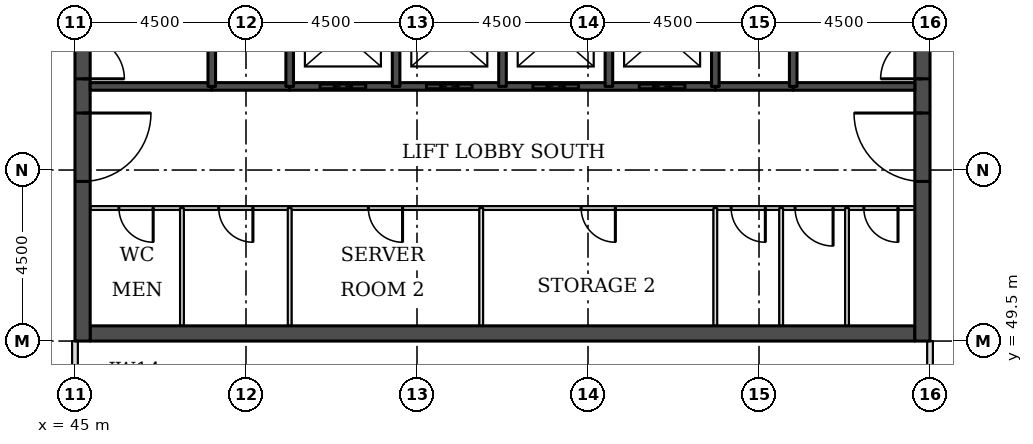
"""IFC4 building model, lengths in metres.
Left out: names, types, materials, properties, quantities, classifications, styles, units other than length and angle.
Written with IfcOpenShell. Run it as: python <this file> out.ifc"""

import sys

from ifc_helpers import new_model, si_unit, direction, frame, frame_2d, origin, place, context, subcontext, project, spatial, rectangle, extrude, element, fill, save


model = new_model("IFC4")
c1 = context("Model", 3, precision=1e-05, world=origin(), true_north=direction((0.0, 1.0)))
c2 = subcontext(c1, "Body", "Model", "MODEL_VIEW")
j1 = project(units=[si_unit("LENGTHUNIT", "METRE"), si_unit("PLANEANGLEUNIT", "RADIAN")], contexts=[c1])
p1 = place(None, origin())
s1 = spatial("IfcSite", under=j1, at=p1, CompositionType="ELEMENT")
p2 = place(p1, origin())
s2 = spatial("IfcBuilding", under=s1, at=p2, CompositionType="ELEMENT")
p3 = place(p2, frame((0.0, 0.0, 155.1)))
s3 = spatial("IfcBuildingStorey", under=s2, at=p3, CompositionType="ELEMENT", Elevation=155.1)
p4 = place(p3, frame((45.4, 49.7, 0.0), z_axis=(0.0, 0.0, 1.0), x_axis=(1.0, 0.0, 0.0)))
e1 = element("IfcWall", 1, at=p4, inside=s3, PredefinedType="SHEAR", context=c2, shape_type="SweptSolid", body=[
    extrude(rectangle(XDim=21.7, YDim=0.4, at=frame_2d((10.85, 0.0))), origin(), (0.0, 0.0, 1.0), 3.7),
])
p5 = place(p3, frame((45.2, 49.5, 0.0), z_axis=(0.0, 0.0, 1.0), x_axis=(0.0, 1.0, 0.0)))
e2 = element("IfcWall", 2, at=p5, inside=s3, PredefinedType="SHEAR", context=c2, shape_type="SweptSolid", body=[
    extrude(rectangle(XDim=22.5, YDim=0.4, at=frame_2d((11.25, 0.0))), origin(), (0.0, 0.0, 1.0), 3.7),
])
p6 = place(p5, frame((4.2, 0.0, 0.0)))
e3 = element("IfcOpeningElement", 3, at=p6, cuts=e2, PredefinedType="OPENING", context=c2, shape_type="SweptSolid", body=[
    extrude(rectangle(XDim=1.8, YDim=2.1, at=frame_2d((0.9, 1.05))), frame((0.0, 0.21, 0.0), z_axis=(0.0, -1.0, 0.0), x_axis=(1.0, 0.0, 0.0)), (0.0, 0.0, 1.0), 0.42),
])
p7 = place(p5, frame((6.9, 0.0, 0.0)))
e4 = element("IfcOpeningElement", 4, at=p7, cuts=e2, PredefinedType="OPENING", context=c2, shape_type="SweptSolid", body=[
    extrude(rectangle(XDim=1.1, YDim=2.1, at=frame_2d((0.55, 1.05))), frame((0.0, 0.21, 0.0), z_axis=(0.0, -1.0, 0.0), x_axis=(1.0, 0.0, 0.0)), (0.0, 0.0, 1.0), 0.42),
])
p8 = place(p5, frame((13.6, 0.0, 0.0)))
e5 = element("IfcOpeningElement", 5, at=p8, cuts=e2, PredefinedType="OPENING", context=c2, shape_type="SweptSolid", body=[
    extrude(rectangle(XDim=1.1, YDim=2.1, at=frame_2d((0.55, 1.05))), frame((0.0, 0.21, 0.0), z_axis=(0.0, -1.0, 0.0), x_axis=(1.0, 0.0, 0.0)), (0.0, 0.0, 1.0), 0.42),
])
p9 = place(p5, frame((16.5, 0.0, 0.0)))
e6 = element("IfcOpeningElement", 6, at=p9, cuts=e2, PredefinedType="OPENING", context=c2, shape_type="SweptSolid", body=[
    extrude(rectangle(XDim=1.8, YDim=2.1, at=frame_2d((0.9, 1.05))), frame((0.0, 0.21, 0.0), z_axis=(0.0, -1.0, 0.0), x_axis=(1.0, 0.0, 0.0)), (0.0, 0.0, 1.0), 0.42),
])
p10 = place(p3, frame((67.3, 49.5, 0.0), z_axis=(0.0, 0.0, 1.0), x_axis=(0.0, 1.0, 0.0)))
e7 = element("IfcWall", 7, at=p10, inside=s3, PredefinedType="SHEAR", context=c2, shape_type="SweptSolid", body=[
    extrude(rectangle(XDim=22.5, YDim=0.4, at=frame_2d((11.25, 0.0))), origin(), (0.0, 0.0, 1.0), 3.7),
])
p11 = place(p10, frame((4.2, 0.0, 0.0)))
e8 = element("IfcOpeningElement", 8, at=p11, cuts=e7, PredefinedType="OPENING", context=c2, shape_type="SweptSolid", body=[
    extrude(rectangle(XDim=1.8, YDim=2.1, at=frame_2d((0.9, 1.05))), frame((0.0, 0.21, 0.0), z_axis=(0.0, -1.0, 0.0), x_axis=(1.0, 0.0, 0.0)), (0.0, 0.0, 1.0), 0.42),
])
p12 = place(p10, frame((6.9, 0.0, 0.0)))
e9 = element("IfcOpeningElement", 9, at=p12, cuts=e7, PredefinedType="OPENING", context=c2, shape_type="SweptSolid", body=[
    extrude(rectangle(XDim=1.1, YDim=2.1, at=frame_2d((0.55, 1.05))), frame((0.0, 0.21, 0.0), z_axis=(0.0, -1.0, 0.0), x_axis=(1.0, 0.0, 0.0)), (0.0, 0.0, 1.0), 0.42),
])
p13 = place(p10, frame((13.6, 0.0, 0.0)))
e10 = element("IfcOpeningElement", 10, at=p13, cuts=e7, PredefinedType="OPENING", context=c2, shape_type="SweptSolid", body=[
    extrude(rectangle(XDim=1.1, YDim=2.1, at=frame_2d((0.55, 1.05))), frame((0.0, 0.21, 0.0), z_axis=(0.0, -1.0, 0.0), x_axis=(1.0, 0.0, 0.0)), (0.0, 0.0, 1.0), 0.42),
])
p14 = place(p10, frame((16.5, 0.0, 0.0)))
e11 = element("IfcOpeningElement", 11, at=p14, cuts=e7, PredefinedType="OPENING", context=c2, shape_type="SweptSolid", body=[
    extrude(rectangle(XDim=1.8, YDim=2.1, at=frame_2d((0.9, 1.05))), frame((0.0, 0.21, 0.0), z_axis=(0.0, -1.0, 0.0), x_axis=(1.0, 0.0, 0.0)), (0.0, 0.0, 1.0), 0.42),
])
p15 = place(p3, frame((67.5, 40.05, 0.0), z_axis=(0.0, 0.0, 1.0), x_axis=(0.0, 1.0, 0.0)))
e12 = element("IfcWall", 12, at=p15, inside=s3, PredefinedType="PARTITIONING", context=c2, shape_type="SweptSolid", body=[
    extrude(rectangle(XDim=9.45, YDim=0.15, at=frame_2d((4.725, 0.0))), origin(), (0.0, 0.0, 1.0), 3.022),
])
p16 = place(p3, frame((45.0, 48.0, 0.0), z_axis=(0.0, 0.0, 1.0), x_axis=(0.0, 1.0, 0.0)))
e13 = element("IfcWall", 13, at=p16, inside=s3, PredefinedType="PARTITIONING", context=c2, shape_type="SweptSolid", body=[
    extrude(rectangle(XDim=1.5, YDim=0.15, at=frame_2d((0.75, 0.0))), origin(), (0.0, 0.0, 1.0), 3.022),
])
p17 = place(p3, frame((45.4, 53.0, 0.0), z_axis=(0.0, 0.0, 1.0), x_axis=(1.0, 0.0, 0.0)))
e14 = element("IfcWall", 14, at=p17, inside=s3, PredefinedType="PARTITIONING", context=c2, shape_type="SweptSolid", body=[
    extrude(rectangle(XDim=21.7, YDim=0.1, at=frame_2d((10.85, 0.0))), origin(), (0.0, 0.0, 1.0), 3.55),
])
p18 = place(p17, frame((20.357, 0.0, 0.0)))
e15 = element("IfcOpeningElement", 15, at=p18, cuts=e14, PredefinedType="OPENING", context=c2, shape_type="SweptSolid", body=[
    extrude(rectangle(XDim=0.9, YDim=2.1, at=frame_2d((0.45, 1.05))), frame((0.0, 0.06, 0.0), z_axis=(0.0, -1.0, 0.0), x_axis=(1.0, 0.0, 0.0)), (0.0, 0.0, 1.0), 0.12),
])
p19 = place(p17, frame((18.549, 0.0, 0.0)))
e16 = element("IfcOpeningElement", 16, at=p19, cuts=e14, PredefinedType="OPENING", context=c2, shape_type="SweptSolid", body=[
    extrude(rectangle(XDim=1.0, YDim=2.1, at=frame_2d((0.5, 1.05))), frame((0.0, 0.06, 0.0), z_axis=(0.0, -1.0, 0.0), x_axis=(1.0, 0.0, 0.0)), (0.0, 0.0, 1.0), 0.12),
])
p20 = place(p17, frame((16.866, 0.0, 0.0)))
e17 = element("IfcOpeningElement", 17, at=p20, cuts=e14, PredefinedType="OPENING", context=c2, shape_type="SweptSolid", body=[
    extrude(rectangle(XDim=0.9, YDim=2.1, at=frame_2d((0.45, 1.05))), frame((0.0, 0.06, 0.0), z_axis=(0.0, -1.0, 0.0), x_axis=(1.0, 0.0, 0.0)), (0.0, 0.0, 1.0), 0.12),
])
p21 = place(p17, frame((0.758, 0.0, 0.0)))
e18 = element("IfcOpeningElement", 18, at=p21, cuts=e14, PredefinedType="OPENING", context=c2, shape_type="SweptSolid", body=[
    extrude(rectangle(XDim=0.9, YDim=2.1, at=frame_2d((0.45, 1.05))), frame((0.0, 0.06, 0.0), z_axis=(0.0, -1.0, 0.0), x_axis=(1.0, 0.0, 0.0)), (0.0, 0.0, 1.0), 0.12),
])
p22 = place(p17, frame((3.383, 0.0, 0.0)))
e19 = element("IfcOpeningElement", 19, at=p22, cuts=e14, PredefinedType="OPENING", context=c2, shape_type="SweptSolid", body=[
    extrude(rectangle(XDim=0.9, YDim=2.1, at=frame_2d((0.45, 1.05))), frame((0.0, 0.06, 0.0), z_axis=(0.0, -1.0, 0.0), x_axis=(1.0, 0.0, 0.0)), (0.0, 0.0, 1.0), 0.12),
])
p23 = place(p17, frame((7.32, 0.0, 0.0)))
e20 = element("IfcOpeningElement", 20, at=p23, cuts=e14, PredefinedType="OPENING", context=c2, shape_type="SweptSolid", body=[
    extrude(rectangle(XDim=0.9, YDim=2.1, at=frame_2d((0.45, 1.05))), frame((0.0, 0.06, 0.0), z_axis=(0.0, -1.0, 0.0), x_axis=(1.0, 0.0, 0.0)), (0.0, 0.0, 1.0), 0.12),
])
p24 = place(p17, frame((12.92, 0.0, 0.0)))
e21 = element("IfcOpeningElement", 21, at=p24, cuts=e14, PredefinedType="OPENING", context=c2, shape_type="SweptSolid", body=[
    extrude(rectangle(XDim=0.9, YDim=2.1, at=frame_2d((0.45, 1.05))), frame((0.0, 0.06, 0.0), z_axis=(0.0, -1.0, 0.0), x_axis=(1.0, 0.0, 0.0)), (0.0, 0.0, 1.0), 0.12),
])
for number, where, z_axis, x_axis in (
    (22, (48.6, 56.2, 0.0), (0.0, 0.0, 1.0), (1.0, 0.0, 0.0)),
    (23, (61.85, 56.2, 0.0), (0.0, 0.0, 1.0), (1.0, 0.0, 0.0)),
):
    element("IfcWall", number, at=place(p3, frame(where, z_axis=z_axis, x_axis=x_axis)), inside=s3, PredefinedType="SOLIDWALL", context=c2, shape_type="SweptSolid", body=[
        extrude(rectangle(XDim=2.05, YDim=0.2, at=frame_2d((1.025, 0.0))), origin(), (0.0, 0.0, 1.0), 3.55),
    ])
p25 = place(p3, frame((45.4, 56.2, 0.0), z_axis=(0.0, 0.0, 1.0), x_axis=(1.0, 0.0, 0.0)))
e24 = element("IfcWall", 24, at=p25, inside=s3, PredefinedType="SOLIDWALL", context=c2, shape_type="SweptSolid", body=[
    extrude(rectangle(XDim=3.2, YDim=0.2, at=frame_2d((1.6, 0.0))), origin(), (0.0, 0.0, 1.0), 3.55),
])
p26 = place(p3, frame((50.65, 56.2, 0.0), z_axis=(0.0, 0.0, 1.0), x_axis=(1.0, 0.0, 0.0)))
e25 = element("IfcWall", 25, at=p26, inside=s3, PredefinedType="SOLIDWALL", context=c2, shape_type="SweptSolid", body=[
    extrude(rectangle(XDim=11.2, YDim=0.2, at=frame_2d((5.6, 0.0))), origin(), (0.0, 0.0, 1.0), 3.55),
])
p27 = place(p26, frame((0.8, 0.0, 0.0)))
e26 = element("IfcOpeningElement", 26, at=p27, cuts=e25, PredefinedType="OPENING", context=c2, shape_type="SweptSolid", body=[
    extrude(rectangle(XDim=1.2, YDim=2.1, at=frame_2d((0.6, 1.05))), frame((0.0, 0.11, 0.0), z_axis=(0.0, -1.0, 0.0), x_axis=(1.0, 0.0, 0.0)), (0.0, 0.0, 1.0), 0.22),
])
p28 = place(p26, frame((3.6, 0.0, 0.0)))
e27 = element("IfcOpeningElement", 27, at=p28, cuts=e25, PredefinedType="OPENING", context=c2, shape_type="SweptSolid", body=[
    extrude(rectangle(XDim=1.2, YDim=2.1, at=frame_2d((0.6, 1.05))), frame((0.0, 0.11, 0.0), z_axis=(0.0, -1.0, 0.0), x_axis=(1.0, 0.0, 0.0)), (0.0, 0.0, 1.0), 0.22),
])
p29 = place(p26, frame((6.4, 0.0, 0.0)))
e28 = element("IfcOpeningElement", 28, at=p29, cuts=e25, PredefinedType="OPENING", context=c2, shape_type="SweptSolid", body=[
    extrude(rectangle(XDim=1.2, YDim=2.1, at=frame_2d((0.6, 1.05))), frame((0.0, 0.11, 0.0), z_axis=(0.0, -1.0, 0.0), x_axis=(1.0, 0.0, 0.0)), (0.0, 0.0, 1.0), 0.22),
])
p30 = place(p26, frame((9.2, 0.0, 0.0)))
e29 = element("IfcOpeningElement", 29, at=p30, cuts=e25, PredefinedType="OPENING", context=c2, shape_type="SweptSolid", body=[
    extrude(rectangle(XDim=1.2, YDim=2.1, at=frame_2d((0.6, 1.05))), frame((0.0, 0.11, 0.0), z_axis=(0.0, -1.0, 0.0), x_axis=(1.0, 0.0, 0.0)), (0.0, 0.0, 1.0), 0.22),
])
p31 = place(p3, frame((63.9, 56.2, 0.0), z_axis=(0.0, 0.0, 1.0), x_axis=(1.0, 0.0, 0.0)))
e30 = element("IfcWall", 30, at=p31, inside=s3, PredefinedType="SOLIDWALL", context=c2, shape_type="SweptSolid", body=[
    extrude(rectangle(XDim=3.2, YDim=0.2, at=frame_2d((1.6, 0.0))), origin(), (0.0, 0.0, 1.0), 3.55),
])
p32 = place(p3, frame((47.815, 49.9, 0.0), z_axis=(0.0, 0.0, 1.0), x_axis=(0.0, 1.0, 0.0)))
e31 = element("IfcWall", 31, at=p32, inside=s3, PredefinedType="PARTITIONING", context=c2, shape_type="SweptSolid", body=[
    extrude(rectangle(XDim=3.1, YDim=0.1, at=frame_2d((1.55, 0.0))), origin(), (0.0, 0.0, 1.0), 3.55),
])
p33 = place(p3, frame((48.6, 56.2, 0.0), z_axis=(0.0, 0.0, 1.0), x_axis=(0.0, 1.0, 0.0)))
e32 = element("IfcWall", 32, at=p33, inside=s3, PredefinedType="SOLIDWALL", context=c2, shape_type="SweptSolid", body=[
    extrude(rectangle(XDim=5.8, YDim=0.2, at=frame_2d((2.9, 0.0))), origin(), (0.0, 0.0, 1.0), 3.55),
])
p34 = place(p3, frame((50.65, 49.9, 0.0), z_axis=(0.0, 0.0, 1.0), x_axis=(0.0, 1.0, 0.0)))
e33 = element("IfcWall", 33, at=p34, inside=s3, PredefinedType="PARTITIONING", context=c2, shape_type="SweptSolid", body=[
    extrude(rectangle(XDim=3.1, YDim=0.1, at=frame_2d((1.55, 0.0))), origin(), (0.0, 0.0, 1.0), 3.55),
])
for number, where, z_axis, x_axis in (
    (34, (50.65, 56.2, 0.0), (0.0, 0.0, 1.0), (0.0, 1.0, 0.0)),
    (35, (53.45, 56.2, 0.0), (0.0, 0.0, 1.0), (0.0, 1.0, 0.0)),
):
    element("IfcWall", number, at=place(p3, frame(where, z_axis=z_axis, x_axis=x_axis)), inside=s3, PredefinedType="SOLIDWALL", context=c2, shape_type="SweptSolid", body=[
        extrude(rectangle(XDim=2.8, YDim=0.2, at=frame_2d((1.4, 0.0))), origin(), (0.0, 0.0, 1.0), 3.55),
    ])
p35 = place(p3, frame((55.69, 49.9, 0.0), z_axis=(0.0, 0.0, 1.0), x_axis=(0.0, 1.0, 0.0)))
e36 = element("IfcWall", 36, at=p35, inside=s3, PredefinedType="PARTITIONING", context=c2, shape_type="SweptSolid", body=[
    extrude(rectangle(XDim=3.1, YDim=0.1, at=frame_2d((1.55, 0.0))), origin(), (0.0, 0.0, 1.0), 3.55),
])
for number, where, z_axis, x_axis in (
    (37, (56.25, 56.2, 0.0), (0.0, 0.0, 1.0), (0.0, 1.0, 0.0)),
    (38, (59.05, 56.2, 0.0), (0.0, 0.0, 1.0), (0.0, 1.0, 0.0)),
):
    element("IfcWall", number, at=place(p3, frame(where, z_axis=z_axis, x_axis=x_axis)), inside=s3, PredefinedType="SOLIDWALL", context=c2, shape_type="SweptSolid", body=[
        extrude(rectangle(XDim=2.8, YDim=0.2, at=frame_2d((1.4, 0.0))), origin(), (0.0, 0.0, 1.0), 3.55),
    ])
p36 = place(p3, frame((61.85, 49.9, 0.0), z_axis=(0.0, 0.0, 1.0), x_axis=(0.0, 1.0, 0.0)))
e39 = element("IfcWall", 39, at=p36, inside=s3, PredefinedType="PARTITIONING", context=c2, shape_type="SweptSolid", body=[
    extrude(rectangle(XDim=3.1, YDim=0.1, at=frame_2d((1.55, 0.0))), origin(), (0.0, 0.0, 1.0), 3.55),
])
p37 = place(p3, frame((61.85, 56.2, 0.0), z_axis=(0.0, 0.0, 1.0), x_axis=(0.0, 1.0, 0.0)))
e40 = element("IfcWall", 40, at=p37, inside=s3, PredefinedType="SOLIDWALL", context=c2, shape_type="SweptSolid", body=[
    extrude(rectangle(XDim=2.8, YDim=0.2, at=frame_2d((1.4, 0.0))), origin(), (0.0, 0.0, 1.0), 3.55),
])
p38 = place(p3, frame((63.583, 49.9, 0.0), z_axis=(0.0, 0.0, 1.0), x_axis=(0.0, 1.0, 0.0)))
e41 = element("IfcWall", 41, at=p38, inside=s3, PredefinedType="PARTITIONING", context=c2, shape_type="SweptSolid", body=[
    extrude(rectangle(XDim=3.1, YDim=0.1, at=frame_2d((1.55, 0.0))), origin(), (0.0, 0.0, 1.0), 3.55),
])
p39 = place(p3, frame((63.9, 56.2, 0.0), z_axis=(0.0, 0.0, 1.0), x_axis=(0.0, 1.0, 0.0)))
e42 = element("IfcWall", 42, at=p39, inside=s3, PredefinedType="SOLIDWALL", context=c2, shape_type="SweptSolid", body=[
    extrude(rectangle(XDim=5.8, YDim=0.2, at=frame_2d((2.9, 0.0))), origin(), (0.0, 0.0, 1.0), 3.55),
])
p40 = place(p3, frame((65.315, 49.9, 0.0), z_axis=(0.0, 0.0, 1.0), x_axis=(0.0, 1.0, 0.0)))
e43 = element("IfcWall", 43, at=p40, inside=s3, PredefinedType="PARTITIONING", context=c2, shape_type="SweptSolid", body=[
    extrude(rectangle(XDim=3.1, YDim=0.1, at=frame_2d((1.55, 0.0))), origin(), (0.0, 0.0, 1.0), 3.55),
])
p41 = place(p27, origin())
e44 = element("IfcDoor", 44, at=p41, inside=s3, OperationType="DOUBLE_DOOR_SLIDING", PredefinedType="DOOR", context=c2, shape_type="SweptSolid", body=[
    extrude(rectangle(XDim=1.2, YDim=2.1, at=frame_2d((0.6, 1.05))), frame((0.0, 0.025, 0.0), z_axis=(0.0, -1.0, 0.0), x_axis=(1.0, 0.0, 0.0)), (0.0, 0.0, 1.0), 0.05),
])
fill(e26, e44)
p42 = place(p28, origin())
e45 = element("IfcDoor", 45, at=p42, inside=s3, OperationType="DOUBLE_DOOR_SLIDING", PredefinedType="DOOR", context=c2, shape_type="SweptSolid", body=[
    extrude(rectangle(XDim=1.2, YDim=2.1, at=frame_2d((0.6, 1.05))), frame((0.0, 0.025, 0.0), z_axis=(0.0, -1.0, 0.0), x_axis=(1.0, 0.0, 0.0)), (0.0, 0.0, 1.0), 0.05),
])
fill(e27, e45)
p43 = place(p29, origin())
e46 = element("IfcDoor", 46, at=p43, inside=s3, OperationType="DOUBLE_DOOR_SLIDING", PredefinedType="DOOR", context=c2, shape_type="SweptSolid", body=[
    extrude(rectangle(XDim=1.2, YDim=2.1, at=frame_2d((0.6, 1.05))), frame((0.0, 0.025, 0.0), z_axis=(0.0, -1.0, 0.0), x_axis=(1.0, 0.0, 0.0)), (0.0, 0.0, 1.0), 0.05),
])
fill(e28, e46)
p44 = place(p30, origin())
e47 = element("IfcDoor", 47, at=p44, inside=s3, OperationType="DOUBLE_DOOR_SLIDING", PredefinedType="DOOR", context=c2, shape_type="SweptSolid", body=[
    extrude(rectangle(XDim=1.2, YDim=2.1, at=frame_2d((0.6, 1.05))), frame((0.0, 0.025, 0.0), z_axis=(0.0, -1.0, 0.0), x_axis=(1.0, 0.0, 0.0)), (0.0, 0.0, 1.0), 0.05),
])
fill(e29, e47)
p45 = place(p6, frame((1.8, 0.0, 0.0), z_axis=(0.0, 0.0, 1.0), x_axis=(-1.0, 0.0, 0.0)))
e48 = element("IfcDoor", 48, at=p45, inside=s3, OperationType="SINGLE_SWING_LEFT", PredefinedType="DOOR", context=c2, shape_type="SweptSolid", body=[
    extrude(rectangle(XDim=1.8, YDim=2.1, at=frame_2d((0.9, 1.05))), frame((0.0, 0.025, 0.0), z_axis=(0.0, -1.0, 0.0), x_axis=(1.0, 0.0, 0.0)), (0.0, 0.0, 1.0), 0.05),
])
fill(e3, e48)
p46 = place(p7, frame((1.1, 0.0, 0.0), z_axis=(0.0, 0.0, 1.0), x_axis=(-1.0, 0.0, 0.0)))
e49 = element("IfcDoor", 49, at=p46, inside=s3, OperationType="SINGLE_SWING_RIGHT", PredefinedType="DOOR", context=c2, shape_type="SweptSolid", body=[
    extrude(rectangle(XDim=1.1, YDim=2.1, at=frame_2d((0.55, 1.05))), frame((0.0, 0.025, 0.0), z_axis=(0.0, -1.0, 0.0), x_axis=(1.0, 0.0, 0.0)), (0.0, 0.0, 1.0), 0.05),
])
fill(e4, e49)
p47 = place(p11, origin())
e50 = element("IfcDoor", 50, at=p47, inside=s3, OperationType="SINGLE_SWING_RIGHT", PredefinedType="DOOR", context=c2, shape_type="SweptSolid", body=[
    extrude(rectangle(XDim=1.8, YDim=2.1, at=frame_2d((0.9, 1.05))), frame((0.0, 0.025, 0.0), z_axis=(0.0, -1.0, 0.0), x_axis=(1.0, 0.0, 0.0)), (0.0, 0.0, 1.0), 0.05),
])
fill(e8, e50)
p48 = place(p12, origin())
e51 = element("IfcDoor", 51, at=p48, inside=s3, OperationType="SINGLE_SWING_LEFT", PredefinedType="DOOR", context=c2, shape_type="SweptSolid", body=[
    extrude(rectangle(XDim=1.1, YDim=2.1, at=frame_2d((0.55, 1.05))), frame((0.0, 0.025, 0.0), z_axis=(0.0, -1.0, 0.0), x_axis=(1.0, 0.0, 0.0)), (0.0, 0.0, 1.0), 0.05),
])
fill(e9, e51)
p49 = place(p18, frame((0.9, 0.0, 0.0), z_axis=(0.0, 0.0, 1.0), x_axis=(-1.0, 0.0, 0.0)))
e52 = element("IfcDoor", 52, at=p49, inside=s3, OperationType="SINGLE_SWING_LEFT", PredefinedType="DOOR", context=c2, shape_type="SweptSolid", body=[
    extrude(rectangle(XDim=0.9, YDim=2.1, at=frame_2d((0.45, 1.05))), frame((0.0, 0.025, 0.0), z_axis=(0.0, -1.0, 0.0), x_axis=(1.0, 0.0, 0.0)), (0.0, 0.0, 1.0), 0.05),
])
fill(e15, e52)
p50 = place(p19, frame((1.0, 0.0, 0.0), z_axis=(0.0, 0.0, 1.0), x_axis=(-1.0, 0.0, 0.0)))
e53 = element("IfcDoor", 53, at=p50, inside=s3, OperationType="SINGLE_SWING_LEFT", PredefinedType="DOOR", context=c2, shape_type="SweptSolid", body=[
    extrude(rectangle(XDim=1.0, YDim=2.1, at=frame_2d((0.5, 1.05))), frame((0.0, 0.025, 0.0), z_axis=(0.0, -1.0, 0.0), x_axis=(1.0, 0.0, 0.0)), (0.0, 0.0, 1.0), 0.05),
])
fill(e16, e53)
p51 = place(p20, frame((0.9, 0.0, 0.0), z_axis=(0.0, 0.0, 1.0), x_axis=(-1.0, 0.0, 0.0)))
e54 = element("IfcDoor", 54, at=p51, inside=s3, OperationType="SINGLE_SWING_LEFT", PredefinedType="DOOR", context=c2, shape_type="SweptSolid", body=[
    extrude(rectangle(XDim=0.9, YDim=2.1, at=frame_2d((0.45, 1.05))), frame((0.0, 0.025, 0.0), z_axis=(0.0, -1.0, 0.0), x_axis=(1.0, 0.0, 0.0)), (0.0, 0.0, 1.0), 0.05),
])
fill(e17, e54)
p52 = place(p21, frame((0.9, 0.0, 0.0), z_axis=(0.0, 0.0, 1.0), x_axis=(-1.0, 0.0, 0.0)))
e55 = element("IfcDoor", 55, at=p52, inside=s3, OperationType="SINGLE_SWING_LEFT", PredefinedType="DOOR", context=c2, shape_type="SweptSolid", body=[
    extrude(rectangle(XDim=0.9, YDim=2.1, at=frame_2d((0.45, 1.05))), frame((0.0, 0.025, 0.0), z_axis=(0.0, -1.0, 0.0), x_axis=(1.0, 0.0, 0.0)), (0.0, 0.0, 1.0), 0.05),
])
fill(e18, e55)
p53 = place(p22, frame((0.9, 0.0, 0.0), z_axis=(0.0, 0.0, 1.0), x_axis=(-1.0, 0.0, 0.0)))
e56 = element("IfcDoor", 56, at=p53, inside=s3, OperationType="SINGLE_SWING_LEFT", PredefinedType="DOOR", context=c2, shape_type="SweptSolid", body=[
    extrude(rectangle(XDim=0.9, YDim=2.1, at=frame_2d((0.45, 1.05))), frame((0.0, 0.025, 0.0), z_axis=(0.0, -1.0, 0.0), x_axis=(1.0, 0.0, 0.0)), (0.0, 0.0, 1.0), 0.05),
])
fill(e19, e56)
p54 = place(p23, frame((0.9, 0.0, 0.0), z_axis=(0.0, 0.0, 1.0), x_axis=(-1.0, 0.0, 0.0)))
e57 = element("IfcDoor", 57, at=p54, inside=s3, OperationType="SINGLE_SWING_LEFT", PredefinedType="DOOR", context=c2, shape_type="SweptSolid", body=[
    extrude(rectangle(XDim=0.9, YDim=2.1, at=frame_2d((0.45, 1.05))), frame((0.0, 0.025, 0.0), z_axis=(0.0, -1.0, 0.0), x_axis=(1.0, 0.0, 0.0)), (0.0, 0.0, 1.0), 0.05),
])
fill(e20, e57)
p55 = place(p24, frame((0.9, 0.0, 0.0), z_axis=(0.0, 0.0, 1.0), x_axis=(-1.0, 0.0, 0.0)))
e58 = element("IfcDoor", 58, at=p55, inside=s3, OperationType="SINGLE_SWING_LEFT", PredefinedType="DOOR", context=c2, shape_type="SweptSolid", body=[
    extrude(rectangle(XDim=0.9, YDim=2.1, at=frame_2d((0.45, 1.05))), frame((0.0, 0.025, 0.0), z_axis=(0.0, -1.0, 0.0), x_axis=(1.0, 0.0, 0.0)), (0.0, 0.0, 1.0), 0.05),
])
fill(e21, e58)
save(model, sys.argv[1])
